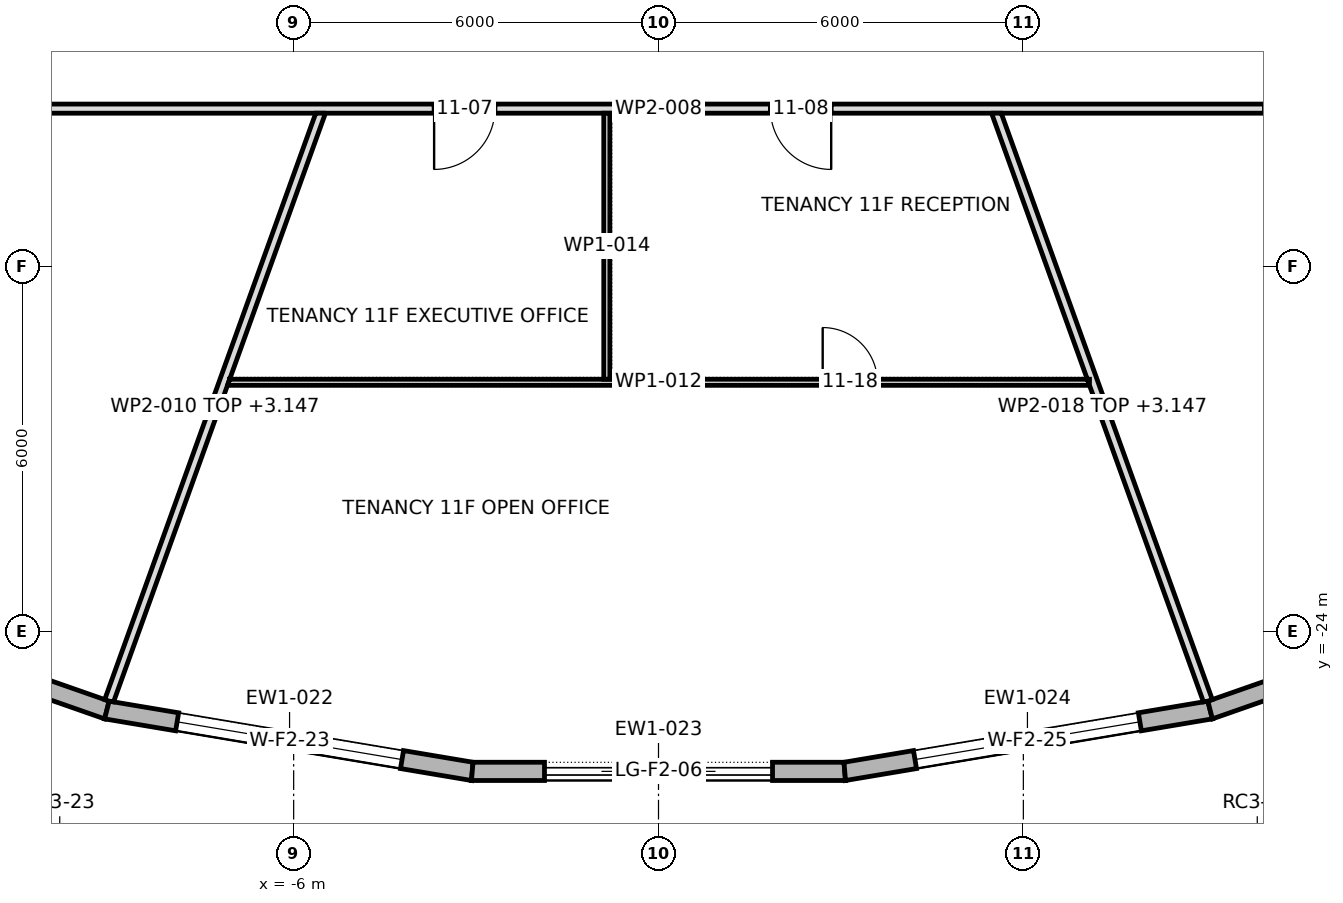
"""IFC4 building model, lengths in metres.
Left out: names, types, materials, properties, quantities, classifications, styles, units other than length and angle.
Written with IfcOpenShell. Run it as: python <this file> out.ifc"""

import sys

from ifc_helpers import new_model, si_unit, direction, frame, frame_2d, origin, place, context, subcontext, project, spatial, polyline, rectangle, outline, extrude, element, fill, save


model = new_model("IFC4")
c1 = context("Model", 3, precision=1e-05, world=origin(), true_north=direction((0.0, 1.0)))
c2 = subcontext(c1, "Body", "Model", "MODEL_VIEW")
j1 = project(units=[si_unit("LENGTHUNIT", "METRE"), si_unit("PLANEANGLEUNIT", "RADIAN")], contexts=[c1])
p1 = place(None, origin())
s1 = spatial("IfcSite", under=j1, at=p1, CompositionType="ELEMENT")
p2 = place(p1, origin())
s2 = spatial("IfcBuilding", under=s1, at=p2, CompositionType="ELEMENT")
p3 = place(p2, frame((0.0, 0.0, 154.9)))
s3 = spatial("IfcBuildingStorey", under=s2, at=p3, CompositionType="ELEMENT", Elevation=154.9)
p4 = place(p3, frame((-14.732, -23.31, 0.0), z_axis=(0.0, 0.0, 1.0), x_axis=(0.943944636678, -0.330103806228, 0.0)))
e1 = element("IfcWall", 1, at=p4, inside=s3, PredefinedType="STANDARD", context=c2, shape_type="SweptSolid", body=[
    extrude(outline(polyline([(-0.013, -0.15), (6.01, -0.15), (5.985, 0.15), (0.013, 0.15), (-0.013, -0.15)])), origin(), (0.0, 0.0, 1.0), 3.9),
])
p5 = place(p4, frame((1.124, 0.0, 0.6)))
e2 = element("IfcOpeningElement", 2, at=p5, cuts=e1, PredefinedType="OPENING", context=c2, shape_type="SweptSolid", body=[
    extrude(rectangle(XDim=3.75, YDim=2.85, at=frame_2d((1.875, 1.425))), frame((0.0, 0.162, 0.0), z_axis=(0.0, -1.0, 0.0), x_axis=(1.0, 0.0, 0.0)), (0.0, 0.0, 1.0), 0.324),
])
p6 = place(p3, frame((-9.071, -25.29, 0.0), z_axis=(0.0, 0.0, 1.0), x_axis=(0.98618955457, -0.165620537547, 0.0)))
e3 = element("IfcWall", 3, at=p6, inside=s3, PredefinedType="STANDARD", context=c2, shape_type="SweptSolid", body=[
    extrude(outline(polyline([(-0.013, -0.15), (6.105, -0.15), (6.08, 0.15), (0.013, 0.15), (-0.013, -0.15)])), origin(), (0.0, 0.0, 1.0), 3.9),
])
p7 = place(p6, frame((1.171, 0.0, 0.6)))
e4 = element("IfcOpeningElement", 4, at=p7, cuts=e3, PredefinedType="OPENING", context=c2, shape_type="SweptSolid", body=[
    extrude(rectangle(XDim=3.75, YDim=2.85, at=frame_2d((1.875, 1.425))), frame((0.0, 0.162, 0.0), z_axis=(0.0, -1.0, 0.0), x_axis=(1.0, 0.0, 0.0)), (0.0, 0.0, 1.0), 0.324),
])
p8 = place(p3, frame((-3.063, -26.299, 0.0), z_axis=(0.0, 0.0, 1.0), x_axis=(1.0, 0.0, 0.0)))
e5 = element("IfcWall", 5, at=p8, inside=s3, PredefinedType="STANDARD", context=c2, shape_type="SweptSolid", body=[
    extrude(outline(polyline([(-0.012, -0.15), (6.138, -0.15), (6.114, 0.15), (0.012, 0.15), (-0.012, -0.15)])), origin(), (0.0, 0.0, 1.0), 3.9),
])
p9 = place(p8, frame((1.188, 0.0, 0.0)))
e6 = element("IfcOpeningElement", 6, at=p9, cuts=e5, PredefinedType="OPENING", context=c2, shape_type="SweptSolid", body=[
    extrude(rectangle(XDim=3.75, YDim=3.45, at=frame_2d((1.875, 1.725))), frame((0.0, 0.162, 0.0), z_axis=(0.0, -1.0, 0.0), x_axis=(1.0, 0.0, 0.0)), (0.0, 0.0, 1.0), 0.324),
])
p10 = place(p3, frame((3.063, -26.299, 0.0), z_axis=(0.0, 0.0, 1.0), x_axis=(0.98618955457, 0.165620537547, 0.0)))
e7 = element("IfcWall", 7, at=p10, inside=s3, PredefinedType="STANDARD", context=c2, shape_type="SweptSolid", body=[
    extrude(outline(polyline([(-0.012, -0.15), (6.105, -0.15), (6.08, 0.15), (0.012, 0.15), (-0.012, -0.15)])), origin(), (0.0, 0.0, 1.0), 3.9),
])
p11 = place(p10, frame((1.171, 0.0, 0.6)))
e8 = element("IfcOpeningElement", 8, at=p11, cuts=e7, PredefinedType="OPENING", context=c2, shape_type="SweptSolid", body=[
    extrude(rectangle(XDim=3.75, YDim=2.85, at=frame_2d((1.875, 1.425))), frame((0.0, 0.162, 0.0), z_axis=(0.0, -1.0, 0.0), x_axis=(1.0, 0.0, 0.0)), (0.0, 0.0, 1.0), 0.324),
])
p12 = place(p3, frame((9.071, -25.29, 0.0), z_axis=(0.0, 0.0, 1.0), x_axis=(0.943944636678, 0.330103806228, 0.0)))
e9 = element("IfcWall", 9, at=p12, inside=s3, PredefinedType="STANDARD", context=c2, shape_type="SweptSolid", body=[
    extrude(outline(polyline([(-0.013, -0.15), (6.011, -0.15), (5.984, 0.15), (0.013, 0.15), (-0.013, -0.15)])), origin(), (0.0, 0.0, 1.0), 3.9),
])
p13 = place(p12, frame((1.124, 0.0, 0.6)))
e10 = element("IfcOpeningElement", 10, at=p13, cuts=e9, PredefinedType="OPENING", context=c2, shape_type="SweptSolid", body=[
    extrude(rectangle(XDim=3.75, YDim=2.85, at=frame_2d((1.875, 1.425))), frame((0.0, 0.162, 0.0), z_axis=(0.0, -1.0, 0.0), x_axis=(1.0, 0.0, 0.0)), (0.0, 0.0, 1.0), 0.324),
])
p14 = place(p3, frame((-15.475, -15.4, 0.0), z_axis=(0.0, 0.0, 1.0), x_axis=(1.0, 0.0, 0.0)))
e11 = element("IfcWall", 11, at=p14, inside=s3, PredefinedType="PARTITIONING", context=c2, shape_type="SweptSolid", body=[
    extrude(outline(polyline([(0.0, -0.075), (1.935, -0.075), (3.869, -0.075), (5.803, -0.075), (7.738, -0.075), (9.672, -0.075), (11.606, -0.075), (13.541, -0.075), (15.475, -0.075), (17.409, -0.075), (19.344, -0.075), (21.278, -0.075), (23.212, -0.075), (25.147, -0.075), (27.081, -0.075), (29.016, -0.075), (30.95, -0.075), (30.8, 0.075), (28.885, 0.075), (26.969, 0.075), (25.053, 0.075), (23.138, 0.075), (21.222, 0.075), (19.306, 0.075), (17.391, 0.075), (15.475, 0.075), (13.56, 0.075), (11.644, 0.075), (9.728, 0.075), (7.812, 0.075), (5.897, 0.075), (3.981, 0.075), (2.066, 0.075), (0.15, 0.075), (0.0, -0.075)])), origin(), (0.0, 0.0, 1.0), 3.9),
])
p15 = place(p14, frame((11.785, 0.0, 0.0)))
e12 = element("IfcOpeningElement", 12, at=p15, cuts=e11, PredefinedType="OPENING", context=c2, shape_type="SweptSolid", body=[
    extrude(rectangle(XDim=1.0, YDim=2.1, at=frame_2d((0.5, 1.05))), frame((0.0, 0.087, 0.0), z_axis=(0.0, -1.0, 0.0), x_axis=(1.0, 0.0, 0.0)), (0.0, 0.0, 1.0), 0.174),
])
p16 = place(p14, frame((17.315, 0.0, 0.0)))
e13 = element("IfcOpeningElement", 13, at=p16, cuts=e11, PredefinedType="OPENING", context=c2, shape_type="SweptSolid", body=[
    extrude(rectangle(XDim=1.0, YDim=2.1, at=frame_2d((0.5, 1.05))), frame((0.0, 0.087, 0.0), z_axis=(0.0, -1.0, 0.0), x_axis=(1.0, 0.0, 0.0)), (0.0, 0.0, 1.0), 0.174),
])
p17 = place(p14, frame((25.44, 0.0, 0.0)))
e14 = element("IfcOpeningElement", 14, at=p17, cuts=e11, PredefinedType="OPENING", context=c2, shape_type="SweptSolid", body=[
    extrude(rectangle(XDim=1.0, YDim=2.1, at=frame_2d((0.5, 1.05))), frame((0.0, 0.087, 0.0), z_axis=(0.0, -1.0, 0.0), x_axis=(1.0, 0.0, 0.0)), (0.0, 0.0, 1.0), 0.174),
])
p18 = place(p3, frame((-9.037, -25.143, 0.0), z_axis=(0.0, 0.0, 1.0), x_axis=(0.338668278724, 0.940905838533, 0.0)))
e15 = element("IfcWall", 15, at=p18, inside=s3, PredefinedType="PARTITIONING", context=c2, shape_type="SweptSolid", body=[
    extrude(outline(polyline([(0.014, -0.075), (1.893, -0.075), (3.772, -0.075), (5.651, -0.075), (5.653, -0.074), (5.653, -0.075), (7.203, -0.075), (8.752, -0.075), (10.302, -0.075), (10.302, -0.074), (10.3, -0.069), (10.3, -0.069), (10.249, 0.075), (8.541, 0.075), (6.832, 0.075), (5.124, 0.075), (3.416, 0.075), (1.708, 0.075), (0.0, 0.075), (0.0, 0.054), (0.0, -0.003), (0.014, -0.075)])), origin(), (0.0, 0.0, 1.0), 3.147),
])
p19 = place(p3, frame((-7.087, -19.9, 0.0), z_axis=(0.0, 0.0, 1.0), x_axis=(1.0, 0.0, 0.0)))
e16 = element("IfcWall", 16, at=p19, inside=s3, PredefinedType="PARTITIONING", context=c2, shape_type="SweptSolid", body=[
    extrude(outline(polyline([(14.175, -0.05), (14.175, -0.049), (14.139, 0.05), (12.176, 0.05), (10.213, 0.05), (8.25, 0.05), (6.287, 0.05), (6.287, 0.05), (6.188, 0.05), (6.188, 0.05), (4.649, 0.05), (3.112, 0.05), (1.573, 0.05), (0.036, 0.05), (0.0, -0.049), (0.0, -0.05), (1.772, -0.05), (3.544, -0.05), (5.315, -0.05), (7.087, -0.05), (8.859, -0.05), (10.631, -0.05), (12.403, -0.05), (14.175, -0.05)])), origin(), (0.0, 0.0, 1.0), 3.9),
])
p20 = place(p19, frame((9.788, 0.0, 0.0)))
e17 = element("IfcOpeningElement", 17, at=p20, cuts=e16, PredefinedType="OPENING", context=c2, shape_type="SweptSolid", body=[
    extrude(rectangle(XDim=0.9, YDim=2.1, at=frame_2d((0.45, 1.05))), frame((0.0, 0.062, 0.0), z_axis=(0.0, -1.0, 0.0), x_axis=(1.0, 0.0, 0.0)), (0.0, 0.0, 1.0), 0.124),
])
p21 = place(p3, frame((-0.85, -15.475, 0.0), z_axis=(0.0, 0.0, 1.0), x_axis=(0.0, -1.0, 0.0)))
e18 = element("IfcWall", 18, at=p21, inside=s3, PredefinedType="PARTITIONING", context=c2, shape_type="SweptSolid", body=[
    extrude(rectangle(XDim=4.375, YDim=0.1, at=frame_2d((2.188, 0.0))), origin(), (0.0, 0.0, 1.0), 3.9),
])
p22 = place(p3, frame((5.548, -15.45, 0.0), z_axis=(0.0, 0.0, 1.0), x_axis=(0.338668278724, -0.940905838533, 0.0)))
e19 = element("IfcWall", 19, at=p22, inside=s3, PredefinedType="PARTITIONING", context=c2, shape_type="SweptSolid", body=[
    extrude(outline(polyline([(0.0, -0.075), (1.55, -0.075), (3.1, -0.075), (4.649, -0.075), (4.661, -0.042), (4.754, -0.075), (6.599, -0.075), (8.444, -0.075), (10.289, -0.075), (10.302, -0.003), (10.302, 0.064), (10.302, 0.075), (8.594, 0.075), (6.886, 0.075), (5.178, 0.075), (3.47, 0.075), (1.762, 0.075), (0.054, 0.075), (0.0, -0.074), (0.0, -0.075)])), origin(), (0.0, 0.0, 1.0), 3.147),
])
p23 = place(p7, origin())
e20 = element("IfcWindow", 20, at=p23, inside=s3, PartitioningType="TRIPLE_PANEL_VERTICAL", PredefinedType="WINDOW", context=c2, shape_type="SweptSolid", body=[
    extrude(rectangle(XDim=3.75, YDim=2.85, at=frame_2d((1.875, 1.425))), frame((0.0, 0.03, 0.0), z_axis=(0.0, -1.0, 0.0), x_axis=(1.0, 0.0, 0.0)), (0.0, 0.0, 1.0), 0.06),
])
fill(e4, e20)
p24 = place(p9, origin())
e21 = element("IfcDoor", 21, at=p24, inside=s3, OperationType="DOUBLE_DOOR_SLIDING", PredefinedType="DOOR", context=c2, shape_type="SweptSolid", body=[
    extrude(rectangle(XDim=3.75, YDim=3.45, at=frame_2d((1.875, 1.725))), frame((0.0, 0.025, 0.0), z_axis=(0.0, -1.0, 0.0), x_axis=(1.0, 0.0, 0.0)), (0.0, 0.0, 1.0), 0.05),
])
fill(e6, e21)
p25 = place(p11, origin())
e22 = element("IfcWindow", 22, at=p25, inside=s3, PartitioningType="TRIPLE_PANEL_VERTICAL", PredefinedType="WINDOW", context=c2, shape_type="SweptSolid", body=[
    extrude(rectangle(XDim=3.75, YDim=2.85, at=frame_2d((1.875, 1.425))), frame((0.0, 0.03, 0.0), z_axis=(0.0, -1.0, 0.0), x_axis=(1.0, 0.0, 0.0)), (0.0, 0.0, 1.0), 0.06),
])
fill(e8, e22)
p26 = place(p15, frame((1.0, 0.0, 0.0), z_axis=(0.0, 0.0, 1.0), x_axis=(-1.0, 0.0, 0.0)))
e23 = element("IfcDoor", 23, at=p26, inside=s3, OperationType="SINGLE_SWING_LEFT", PredefinedType="DOOR", context=c2, shape_type="SweptSolid", body=[
    extrude(rectangle(XDim=1.0, YDim=2.1, at=frame_2d((0.5, 1.05))), frame((0.0, 0.025, 0.0), z_axis=(0.0, -1.0, 0.0), x_axis=(1.0, 0.0, 0.0)), (0.0, 0.0, 1.0), 0.05),
])
fill(e12, e23)
p27 = place(p16, frame((1.0, 0.0, 0.0), z_axis=(0.0, 0.0, 1.0), x_axis=(-1.0, 0.0, 0.0)))
e24 = element("IfcDoor", 24, at=p27, inside=s3, OperationType="SINGLE_SWING_RIGHT", PredefinedType="DOOR", context=c2, shape_type="SweptSolid", body=[
    extrude(rectangle(XDim=1.0, YDim=2.1, at=frame_2d((0.5, 1.05))), frame((0.0, 0.025, 0.0), z_axis=(0.0, -1.0, 0.0), x_axis=(1.0, 0.0, 0.0)), (0.0, 0.0, 1.0), 0.05),
])
fill(e13, e24)
p28 = place(p20, origin())
e25 = element("IfcDoor", 25, at=p28, inside=s3, OperationType="SINGLE_SWING_RIGHT", PredefinedType="DOOR", context=c2, shape_type="SweptSolid", body=[
    extrude(rectangle(XDim=0.9, YDim=2.1, at=frame_2d((0.45, 1.05))), frame((0.0, 0.025, 0.0), z_axis=(0.0, -1.0, 0.0), x_axis=(1.0, 0.0, 0.0)), (0.0, 0.0, 1.0), 0.05),
])
fill(e17, e25)
save(model, sys.argv[1])
